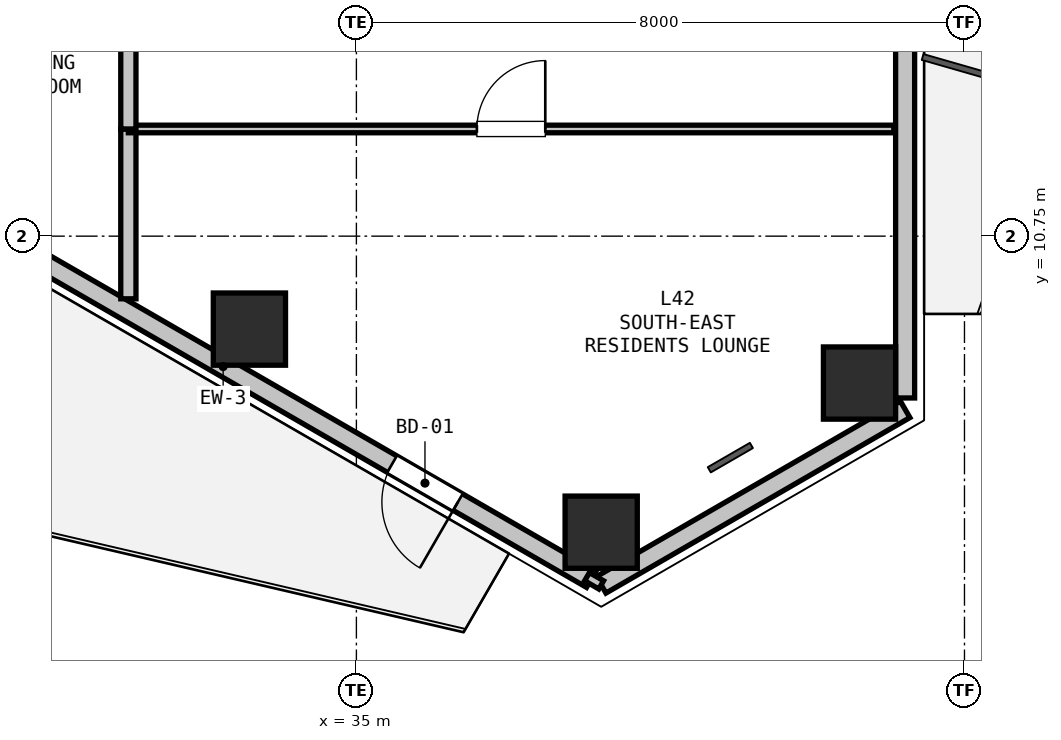
"""IFC4 building model, lengths in metres.
Left out: names, types, materials, properties, quantities, classifications, styles, units other than length and angle.
Written with IfcOpenShell. Run it as: python <this file> out.ifc"""

import sys

from ifc_helpers import new_model, si_unit, direction, frame, frame_2d, origin, origin_2d, place, context, subcontext, project, spatial, rectangle, hollow_rectangle, extrude, element, fill, save


model = new_model("IFC4")
c1 = context("Model", 3, precision=1e-05, world=origin(), true_north=direction((0.0, 1.0)))
c2 = subcontext(c1, "Body", "Model", "MODEL_VIEW")
j1 = project(units=[si_unit("LENGTHUNIT", "METRE"), si_unit("PLANEANGLEUNIT", "RADIAN")], contexts=[c1])
p1 = place(None, origin())
s1 = spatial("IfcSite", under=j1, at=p1, CompositionType="ELEMENT")
p2 = place(p1, origin())
s2 = spatial("IfcBuilding", under=s1, at=p2, CompositionType="ELEMENT")
p3 = place(p2, frame((0.0, 0.0, 150.9)))
s3 = spatial("IfcBuildingStorey", under=s2, at=p3, CompositionType="ELEMENT", Elevation=150.9)
for number, where, z_axis, x_axis in (
    (1, (41.619, 8.817, 0.0), (0.0, 0.0, 1.0), (1.0, 0.0, 0.0)),
    (2, (38.22, 6.855, 0.0), (0.0, 0.0, 1.0), (1.0, 0.0, 0.0)),
    (3, (33.593, 9.527, 0.0), (0.0, 0.0, 1.0), (1.0, 0.0, 0.0)),
):
    element("IfcColumn", number, at=place(p3, frame(where, z_axis=z_axis, x_axis=x_axis)), inside=s3, PredefinedType="COLUMN", context=c2, shape_type="SweptSolid", body=[
        extrude(hollow_rectangle(XDim=0.95, YDim=0.95, WallThickness=0.028, at=origin_2d()), origin(), (0.0, 0.0, 1.0), 3.3),
    ])
p4 = place(p3, frame((42.219, 8.471, 0.0), z_axis=(0.0, 0.0, 1.0), x_axis=(-0.866035021055, -0.499983342029, 0.0)))
e4 = element("IfcWall", 4, at=p4, inside=s3, PredefinedType="SOLIDWALL", context=c2, shape_type="SweptSolid", body=[
    extrude(rectangle(XDim=4.617, YDim=0.25, at=frame_2d((2.309, 0.0))), origin(), (0.0, 0.0, 1.0), 2.68),
])
p5 = place(p3, frame((42.219, 19.807, 0.0), z_axis=(0.0, 0.0, 1.0), x_axis=(0.0, -1.0, 0.0)))
e5 = element("IfcWall", 5, at=p5, inside=s3, PredefinedType="SOLIDWALL", context=c2, shape_type="SweptSolid", body=[
    extrude(rectangle(XDim=11.186, YDim=0.25, at=frame_2d((5.593, 0.0))), origin(), (0.0, 0.0, 1.0), 2.68),
])
p6 = place(p5, frame((2.796, 0.0, 0.9)))
e6 = element("IfcOpeningElement", 6, at=p6, cuts=e5, PredefinedType="OPENING", context=c2, shape_type="SweptSolid", body=[
    extrude(rectangle(XDim=1.2, YDim=1.5, at=frame_2d((0.6, 0.75))), frame((0.0, 0.135, 0.0), z_axis=(0.0, -1.0, 0.0), x_axis=(1.0, 0.0, 0.0)), (0.0, 0.0, 1.0), 0.27),
])
p7 = place(p3, frame((38.091, 6.237, 0.0), z_axis=(0.0, 0.0, 1.0), x_axis=(-0.86602239209, 0.500005216371, 0.0)))
e7 = element("IfcWall", 7, at=p7, inside=s3, PredefinedType="SOLIDWALL", context=c2, shape_type="SweptSolid", body=[
    extrude(rectangle(XDim=11.186, YDim=0.25, at=frame_2d((5.593, 0.0))), origin(), (0.0, 0.0, 1.0), 2.68),
])
p8 = place(p7, frame((2.027, 0.0, 0.0)))
e8 = element("IfcOpeningElement", 8, at=p8, cuts=e7, PredefinedType="OPENING", context=c2, shape_type="SweptSolid", body=[
    extrude(rectangle(XDim=1.0, YDim=2.1, at=frame_2d((0.5, 1.05))), frame((0.0, 0.135, 0.0), z_axis=(0.0, -1.0, 0.0), x_axis=(1.0, 0.0, 0.0)), (0.0, 0.0, 1.0), 0.27),
])
p9 = place(p7, frame((8.571, 0.0, 0.9)))
e9 = element("IfcOpeningElement", 9, at=p9, cuts=e7, PredefinedType="OPENING", context=c2, shape_type="SweptSolid", body=[
    extrude(rectangle(XDim=1.2, YDim=1.4, at=frame_2d((0.6, 0.7))), frame((0.0, 0.135, 0.0), z_axis=(0.0, -1.0, 0.0), x_axis=(1.0, 0.0, 0.0)), (0.0, 0.0, 1.0), 0.27),
])
p10 = place(p3, frame((32.0, 9.926, 0.0), z_axis=(0.0, 0.0, 1.0), x_axis=(0.0, 1.0, 0.0)))
e10 = element("IfcWall", 10, at=p10, inside=s3, PredefinedType="PARTITIONING", context=c2, shape_type="SweptSolid", body=[
    extrude(rectangle(XDim=2.234, YDim=0.2, at=frame_2d((1.117, 0.0))), origin(), (0.0, 0.0, 1.0), 2.365),
])
p11 = place(p3, frame((32.0, 12.16, 0.0), z_axis=(0.0, 0.0, 1.0), x_axis=(1.0, 0.0, 0.0)))
e11 = element("IfcWall", 11, at=p11, inside=s3, PredefinedType="PARTITIONING", context=c2, shape_type="SweptSolid", body=[
    extrude(rectangle(XDim=10.07, YDim=0.1, at=frame_2d((5.035, 0.0))), origin(), (0.0, 0.0, 1.0), 2.433),
])
p12 = place(p11, frame((4.585, 0.0, 0.0)))
e12 = element("IfcOpeningElement", 12, at=p12, cuts=e11, PredefinedType="OPENING", context=c2, shape_type="SweptSolid", body=[
    extrude(rectangle(XDim=0.9, YDim=2.1, at=frame_2d((0.45, 1.05))), frame((0.0, 0.06, 0.0), z_axis=(0.0, -1.0, 0.0), x_axis=(1.0, 0.0, 0.0)), (0.0, 0.0, 1.0), 0.12),
])
p13 = place(p3, frame((38.221, 6.162, 0.0), z_axis=(0.0, 0.0, 1.0), x_axis=(-0.865581379588, 0.500768285049, 0.0)))
e13 = element("IfcWall", 13, at=p13, inside=s3, PredefinedType="PARTITIONING", context=c2, shape_type="SweptSolid", body=[
    extrude(rectangle(XDim=0.216, YDim=0.125, at=frame_2d((0.108, 0.0))), origin(), (0.0, 0.0, 1.0), 3.06),
])
p14 = place(p3, frame((32.0, 12.16, 0.0), z_axis=(0.0, 0.0, 1.0), x_axis=(0.0, 1.0, 0.0)))
e14 = element("IfcWall", 14, at=p14, inside=s3, PredefinedType="PARTITIONING", context=c2, shape_type="SweptSolid", body=[
    extrude(rectangle(XDim=3.69, YDim=0.2, at=frame_2d((1.845, 0.0))), origin(), (0.0, 0.0, 1.0), 3.06),
])
p15 = place(p8, origin())
e15 = element("IfcDoor", 15, at=p15, inside=s3, OperationType="SINGLE_SWING_LEFT", PredefinedType="DOOR", context=c2, shape_type="SweptSolid", body=[
    extrude(rectangle(XDim=1.0, YDim=2.1, at=frame_2d((0.5, 1.05))), frame((0.0, 0.025, 0.0), z_axis=(0.0, -1.0, 0.0), x_axis=(1.0, 0.0, 0.0)), (0.0, 0.0, 1.0), 0.05),
])
fill(e8, e15)
p16 = place(p12, origin())
e16 = element("IfcDoor", 16, at=p16, inside=s3, OperationType="SINGLE_SWING_RIGHT", PredefinedType="DOOR", context=c2, shape_type="SweptSolid", body=[
    extrude(rectangle(XDim=0.9, YDim=2.1, at=frame_2d((0.45, 1.05))), frame((0.0, 0.025, 0.0), z_axis=(0.0, -1.0, 0.0), x_axis=(1.0, 0.0, 0.0)), (0.0, 0.0, 1.0), 0.05),
])
fill(e12, e16)
save(model, sys.argv[1])
